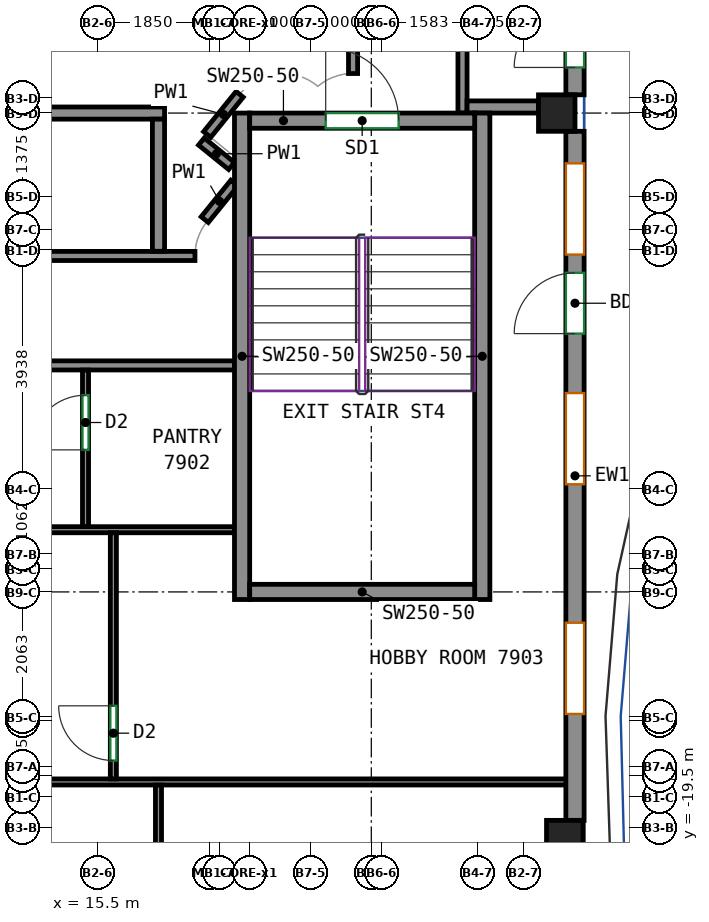
"""IFC4 building model, lengths in metres.
Left out: names, types, materials, properties, quantities, classifications, styles, units other than length and angle.
Written with IfcOpenShell. Run it as: python <this file> out.ifc"""

import sys

from ifc_helpers import new_model, si_unit, direction, frame, frame_2d, origin, origin_2d, place, context, subcontext, project, spatial, rectangle, extrude, source, transform, mapped, element, fill, save


model = new_model("IFC4")
c1 = context("Model", 3, precision=1e-05, world=origin(), true_north=direction((0.0, 1.0)))
c2 = subcontext(c1, "Body", "Model", "MODEL_VIEW")
j1 = project(units=[si_unit("LENGTHUNIT", "METRE"), si_unit("PLANEANGLEUNIT", "RADIAN")], contexts=[c1])
p1 = place(None, origin())
s1 = spatial("IfcSite", under=j1, at=p1, CompositionType="ELEMENT")
p2 = place(p1, origin())
s2 = spatial("IfcBuilding", under=s1, at=p2, CompositionType="ELEMENT")
p3 = place(p2, frame((0.0, 0.0, 315.4)))
s3 = spatial("IfcBuildingStorey", under=s2, at=p3, CompositionType="ELEMENT", Elevation=315.4)
m1 = source(origin(), c2, "Body", "SweptSolid", [
    extrude(rectangle(XDim=0.6, YDim=0.6, at=origin_2d()), origin(), (0.0, 0.0, 1.0), 3.0),
])
for number, where, z_axis, x_axis in (
    (1, (23.05, -7.75, 0.0), (0.0, 0.0, 1.0), (1.0, 0.0, 0.0)),
    (2, (23.182, -19.682, 0.0), (0.0, 0.0, 1.0), (1.0, 0.0, 0.0)),
):
    element("IfcColumn", number, at=place(p3, frame(where, z_axis=z_axis, x_axis=x_axis)), inside=s3, PredefinedType="COLUMN", context=c2, shape_type="MappedRepresentation", body=[
        mapped(m1, transform((0.0, 0.0, 0.0))),
    ])
m2 = source(origin(), c2, "Body", "SweptSolid", [
    extrude(rectangle(XDim=8.0, YDim=0.25, at=frame_2d((4.0, 0.0))), origin(), (0.0, 0.0, 1.0), 3.0),
])
for number, where, z_axis, x_axis in (
    (3, (17.875, -15.75, 0.0), (0.0, 0.0, 1.0), (0.0, 1.0, 0.0)),
    (4, (21.825, -15.75, 0.0), (0.0, 0.0, 1.0), (0.0, 1.0, 0.0)),
):
    element("IfcWall", number, at=place(p3, frame(where, z_axis=z_axis, x_axis=x_axis)), inside=s3, PredefinedType="SHEAR", context=c2, shape_type="MappedRepresentation", body=[
        mapped(m2, transform((0.0, 0.0, 0.0))),
    ])
m3 = source(origin(), c2, "Body", "SweptSolid", [
    extrude(rectangle(XDim=3.7, YDim=0.25, at=frame_2d((1.85, 0.0))), origin(), (0.0, 0.0, 1.0), 3.0),
])
p4 = place(p3, frame((18.0, -15.625, 0.0), z_axis=(0.0, 0.0, 1.0), x_axis=(1.0, 0.0, 0.0)))
e5 = element("IfcWall", 5, at=p4, inside=s3, PredefinedType="SHEAR", context=c2, shape_type="MappedRepresentation", body=[
    mapped(m3, transform((0.0, 0.0, 0.0))),
])
p5 = place(p3, frame((18.0, -7.875, 0.0), z_axis=(0.0, 0.0, 1.0), x_axis=(1.0, 0.0, 0.0)))
e6 = element("IfcWall", 6, at=p5, inside=s3, PredefinedType="SHEAR", context=c2, shape_type="MappedRepresentation", body=[
    mapped(m3, transform((0.0, 0.0, 0.0))),
])
p6 = place(p5, frame((1.25, 0.0, 0.0)))
e7 = element("IfcOpeningElement", 7, at=p6, cuts=e6, PredefinedType="OPENING", context=c2, shape_type="SweptSolid", body=[
    extrude(rectangle(XDim=1.2, YDim=2.1, at=frame_2d((0.6, 1.05))), frame((0.0, 0.135, 0.0), z_axis=(0.0, -1.0, 0.0), x_axis=(1.0, 0.0, 0.0)), (0.0, 0.0, 1.0), 0.27),
])
m4 = source(origin(), c2, "Body", "SweptSolid", [
    extrude(rectangle(XDim=11.332, YDim=0.3, at=frame_2d((5.666, 0.0))), origin(), (0.0, 0.0, 1.0), 3.0),
])
p7 = place(p3, frame((23.35, -19.382, 0.0), z_axis=(0.0, 0.0, 1.0), x_axis=(0.0, 1.0, 0.0)))
e8 = element("IfcWall", 8, at=p7, inside=s3, PredefinedType="SOLIDWALL", context=c2, shape_type="MappedRepresentation", body=[
    mapped(m4, transform((0.0, 0.0, 0.0))),
])
p8 = place(p7, frame((1.75, 0.0, 0.8)))
e9 = element("IfcOpeningElement", 9, at=p8, cuts=e8, PredefinedType="OPENING", context=c2, shape_type="SweptSolid", body=[
    extrude(rectangle(XDim=1.5, YDim=2.05, at=frame_2d((0.75, 1.025))), frame((0.0, 0.16, 0.0), z_axis=(0.0, -1.0, 0.0), x_axis=(1.0, 0.0, 0.0)), (0.0, 0.0, 1.0), 0.32),
])
p9 = place(p7, frame((5.527, 0.0, 0.8)))
e10 = element("IfcOpeningElement", 10, at=p9, cuts=e8, PredefinedType="OPENING", context=c2, shape_type="SweptSolid", body=[
    extrude(rectangle(XDim=1.5, YDim=2.05, at=frame_2d((0.75, 1.025))), frame((0.0, 0.16, 0.0), z_axis=(0.0, -1.0, 0.0), x_axis=(1.0, 0.0, 0.0)), (0.0, 0.0, 1.0), 0.32),
])
p10 = place(p7, frame((9.304, 0.0, 0.8)))
e11 = element("IfcOpeningElement", 11, at=p10, cuts=e8, PredefinedType="OPENING", context=c2, shape_type="SweptSolid", body=[
    extrude(rectangle(XDim=1.5, YDim=2.05, at=frame_2d((0.75, 1.025))), frame((0.0, 0.16, 0.0), z_axis=(0.0, -1.0, 0.0), x_axis=(1.0, 0.0, 0.0)), (0.0, 0.0, 1.0), 0.32),
])
p11 = place(p7, frame((8.004, 0.0, 0.0)))
e12 = element("IfcOpeningElement", 12, at=p11, cuts=e8, PredefinedType="OPENING", context=c2, shape_type="SweptSolid", body=[
    extrude(rectangle(XDim=1.0, YDim=2.1, at=frame_2d((0.5, 1.05))), frame((0.0, 0.16, 0.0), z_axis=(0.0, -1.0, 0.0), x_axis=(1.0, 0.0, 0.0)), (0.0, 0.0, 1.0), 0.32),
])
m5 = source(origin(), c2, "Body", "SweptSolid", [
    extrude(rectangle(XDim=7.275, YDim=0.3, at=frame_2d((3.637, 0.0))), origin(), (0.0, 0.0, 1.0), 3.0),
])
p12 = place(p3, frame((23.35, -7.45, 0.0), z_axis=(0.0, 0.0, 1.0), x_axis=(0.0, 1.0, 0.0)))
e13 = element("IfcWall", 13, at=p12, inside=s3, PredefinedType="SOLIDWALL", context=c2, shape_type="MappedRepresentation", body=[
    mapped(m5, transform((0.0, 0.0, 0.0))),
])
p13 = place(p12, frame((1.75, 0.0, 0.8)))
e14 = element("IfcOpeningElement", 14, at=p13, cuts=e13, PredefinedType="OPENING", context=c2, shape_type="SweptSolid", body=[
    extrude(rectangle(XDim=1.5, YDim=2.05, at=frame_2d((0.75, 1.025))), frame((0.0, 0.16, 0.0), z_axis=(0.0, -1.0, 0.0), x_axis=(1.0, 0.0, 0.0)), (0.0, 0.0, 1.0), 0.32),
])
p14 = place(p12, frame((0.45, 0.0, 0.0)))
e15 = element("IfcOpeningElement", 15, at=p14, cuts=e13, PredefinedType="OPENING", context=c2, shape_type="SweptSolid", body=[
    extrude(rectangle(XDim=1.0, YDim=2.1, at=frame_2d((0.5, 1.05))), frame((0.0, 0.16, 0.0), z_axis=(0.0, -1.0, 0.0), x_axis=(1.0, 0.0, 0.0)), (0.0, 0.0, 1.0), 0.32),
])
p15 = place(p12, frame((5.387, 0.0, 0.8)))
e16 = element("IfcOpeningElement", 16, at=p15, cuts=e13, PredefinedType="OPENING", context=c2, shape_type="SweptSolid", body=[
    extrude(rectangle(XDim=1.5, YDim=2.05, at=frame_2d((0.75, 1.025))), frame((0.0, 0.16, 0.0), z_axis=(0.0, -1.0, 0.0), x_axis=(1.0, 0.0, 0.0)), (0.0, 0.0, 1.0), 0.32),
])
p16 = place(p12, frame((4.087, 0.0, 0.0)))
e17 = element("IfcOpeningElement", 17, at=p16, cuts=e13, PredefinedType="OPENING", context=c2, shape_type="SweptSolid", body=[
    extrude(rectangle(XDim=1.0, YDim=2.1, at=frame_2d((0.5, 1.05))), frame((0.0, 0.16, 0.0), z_axis=(0.0, -1.0, 0.0), x_axis=(1.0, 0.0, 0.0)), (0.0, 0.0, 1.0), 0.32),
])
p17 = place(p3, frame((-4.51, -11.9, 0.0), z_axis=(0.0, 0.0, 1.0), x_axis=(1.0, 0.0, 0.0)))
e18 = element("IfcWall", 18, at=p17, inside=s3, PredefinedType="PARTITIONING", context=c2, shape_type="SweptSolid", body=[
    extrude(rectangle(XDim=22.26, YDim=0.15, at=frame_2d((11.13, 0.0))), origin(), (0.0, 0.0, 1.0), 3.0),
])
p18 = place(p17, frame((9.866, 0.0, 0.0)))
e19 = element("IfcOpeningElement", 19, at=p18, cuts=e18, PredefinedType="OPENING", context=c2, shape_type="SweptSolid", body=[
    extrude(rectangle(XDim=1.0, YDim=2.1, at=frame_2d((0.5, 1.05))), frame((0.0, 0.085, 0.0), z_axis=(0.0, -1.0, 0.0), x_axis=(1.0, 0.0, 0.0)), (0.0, 0.0, 1.0), 0.17),
])
p19 = place(p3, frame((21.5, -7.75, 0.0), z_axis=(0.0, 0.0, 1.0), x_axis=(0.0, 1.0, 0.0)))
e20 = element("IfcWall", 20, at=p19, inside=s3, PredefinedType="PARTITIONING", context=c2, shape_type="SweptSolid", body=[
    extrude(rectangle(XDim=4.999, YDim=0.15, at=frame_2d((2.5, 0.0))), origin(), (0.0, 0.0, 1.0), 3.0),
])
p20 = place(p19, frame((2.565, 0.0, 0.0)))
e21 = element("IfcOpeningElement", 21, at=p20, cuts=e20, PredefinedType="OPENING", context=c2, shape_type="SweptSolid", body=[
    extrude(rectangle(XDim=1.0, YDim=2.1, at=frame_2d((0.5, 1.05))), frame((0.0, 0.085, 0.0), z_axis=(0.0, -1.0, 0.0), x_axis=(1.0, 0.0, 0.0)), (0.0, 0.0, 1.0), 0.17),
])
p21 = place(p3, frame((-13.55, -10.1, 0.0), z_axis=(0.0, 0.0, 1.0), x_axis=(1.0, 0.0, 0.0)))
e22 = element("IfcWall", 22, at=p21, inside=s3, PredefinedType="PARTITIONING", context=c2, shape_type="SweptSolid", body=[
    extrude(rectangle(XDim=30.65, YDim=0.15, at=frame_2d((15.325, 0.0))), origin(), (0.0, 0.0, 1.0), 3.0),
])
p22 = place(p21, frame((13.442, 0.0, 0.0)))
e23 = element("IfcOpeningElement", 23, at=p22, cuts=e22, PredefinedType="OPENING", context=c2, shape_type="SweptSolid", body=[
    extrude(rectangle(XDim=0.9, YDim=2.1, at=frame_2d((0.45, 1.05))), frame((0.0, 0.085, 0.0), z_axis=(0.0, -1.0, 0.0), x_axis=(1.0, 0.0, 0.0)), (0.0, 0.0, 1.0), 0.17),
])
p23 = place(p21, frame((25.452, 0.0, 0.0)))
e24 = element("IfcOpeningElement", 24, at=p23, cuts=e22, PredefinedType="OPENING", context=c2, shape_type="SweptSolid", body=[
    extrude(rectangle(XDim=0.9, YDim=2.1, at=frame_2d((0.45, 1.05))), frame((0.0, 0.085, 0.0), z_axis=(0.0, -1.0, 0.0), x_axis=(1.0, 0.0, 0.0)), (0.0, 0.0, 1.0), 0.17),
])
p24 = place(p3, frame((17.748, -8.902, 0.0), z_axis=(0.0, 0.0, 1.0), x_axis=(-0.630342797145, -0.776316918589, 0.0)))
e25 = element("IfcWall", 25, at=p24, inside=s3, PredefinedType="PARTITIONING", context=c2, shape_type="SweptSolid", body=[
    extrude(rectangle(XDim=0.773, YDim=0.15, at=frame_2d((0.386, 0.0))), origin(), (0.0, 0.0, 1.0), 3.0),
])
p25 = place(p3, frame((17.206, -8.218, 0.0), z_axis=(0.0, 0.0, 1.0), x_axis=(0.776102288291, -0.630607039376, 0.0)))
e26 = element("IfcWall", 26, at=p25, inside=s3, PredefinedType="PARTITIONING", context=c2, shape_type="SweptSolid", body=[
    extrude(rectangle(XDim=0.638, YDim=0.15, at=frame_2d((0.319, 0.0))), origin(), (0.0, 0.0, 1.0), 3.0),
])
p26 = place(p3, frame((17.835, -7.442, 0.0), z_axis=(0.0, 0.0, 1.0), x_axis=(-0.628859024249, -0.777519342281, 0.0)))
e27 = element("IfcWall", 27, at=p26, inside=s3, PredefinedType="PARTITIONING", context=c2, shape_type="SweptSolid", body=[
    extrude(rectangle(XDim=0.849, YDim=0.15, at=frame_2d((0.425, 0.0))), origin(), (0.0, 0.0, 1.0), 3.0),
])
p27 = place(p3, frame((19.7, -7.1, 0.0), z_axis=(0.0, 0.0, 1.0), x_axis=(0.0, 1.0, 0.0)))
e28 = element("IfcWall", 28, at=p27, inside=s3, PredefinedType="PARTITIONING", context=c2, shape_type="SweptSolid", body=[
    extrude(rectangle(XDim=6.901, YDim=0.15, at=frame_2d((3.451, 0.0))), origin(), (0.0, 0.0, 1.0), 3.0),
])
p28 = place(p27, frame((5.601, 0.0, 0.0)))
e29 = element("IfcOpeningElement", 29, at=p28, cuts=e28, PredefinedType="OPENING", context=c2, shape_type="SweptSolid", body=[
    extrude(rectangle(XDim=0.9, YDim=2.1, at=frame_2d((0.45, 1.05))), frame((0.0, 0.085, 0.0), z_axis=(0.0, -1.0, 0.0), x_axis=(1.0, 0.0, 0.0)), (0.0, 0.0, 1.0), 0.17),
])
p29 = place(p3, frame((-1.41, -14.602, 0.0), z_axis=(0.0, 0.0, 1.0), x_axis=(1.0, 0.0, 0.0)))
e30 = element("IfcWall", 30, at=p29, inside=s3, PredefinedType="PARTITIONING", context=c2, shape_type="SweptSolid", body=[
    extrude(rectangle(XDim=19.16, YDim=0.1, at=frame_2d((9.58, 0.0))), origin(), (0.0, 0.0, 1.0), 3.0),
])
p30 = place(p29, frame((4.357, 0.0, 0.0)))
e31 = element("IfcOpeningElement", 31, at=p30, cuts=e30, PredefinedType="OPENING", context=c2, shape_type="SweptSolid", body=[
    extrude(rectangle(XDim=1.0, YDim=2.1, at=frame_2d((0.5, 1.05))), frame((0.0, 0.06, 0.0), z_axis=(0.0, -1.0, 0.0), x_axis=(1.0, 0.0, 0.0)), (0.0, 0.0, 1.0), 0.12),
])
p31 = place(p29, frame((11.804, 0.0, 0.0)))
e32 = element("IfcOpeningElement", 32, at=p31, cuts=e30, PredefinedType="OPENING", context=c2, shape_type="SweptSolid", body=[
    extrude(rectangle(XDim=0.9, YDim=2.1, at=frame_2d((0.45, 1.05))), frame((0.0, 0.06, 0.0), z_axis=(0.0, -1.0, 0.0), x_axis=(1.0, 0.0, 0.0)), (0.0, 0.0, 1.0), 0.12),
])
p32 = place(p29, frame((14.91, 0.0, 0.0)))
e33 = element("IfcOpeningElement", 33, at=p32, cuts=e30, PredefinedType="OPENING", context=c2, shape_type="SweptSolid", body=[
    extrude(rectangle(XDim=0.9, YDim=2.1, at=frame_2d((0.45, 1.05))), frame((0.0, 0.06, 0.0), z_axis=(0.0, -1.0, 0.0), x_axis=(1.0, 0.0, 0.0)), (0.0, 0.0, 1.0), 0.12),
])
p33 = place(p3, frame((-4.6, -18.75, 0.0), z_axis=(0.0, 0.0, 1.0), x_axis=(1.0, 0.0, 0.0)))
e34 = element("IfcWall", 34, at=p33, inside=s3, PredefinedType="PARTITIONING", context=c2, shape_type="SweptSolid", body=[
    extrude(rectangle(XDim=27.85, YDim=0.1, at=frame_2d((13.925, 0.0))), origin(), (0.0, 0.0, 1.0), 3.0),
])
p34 = place(p33, frame((3.741, 0.0, 0.0)))
e35 = element("IfcOpeningElement", 35, at=p34, cuts=e34, PredefinedType="OPENING", context=c2, shape_type="SweptSolid", body=[
    extrude(rectangle(XDim=0.9, YDim=2.1, at=frame_2d((0.45, 1.05))), frame((0.0, 0.06, 0.0), z_axis=(0.0, -1.0, 0.0), x_axis=(1.0, 0.0, 0.0)), (0.0, 0.0, 1.0), 0.12),
])
p35 = place(p33, frame((5.91, 0.0, 0.0)))
e36 = element("IfcOpeningElement", 36, at=p35, cuts=e34, PredefinedType="OPENING", context=c2, shape_type="SweptSolid", body=[
    extrude(rectangle(XDim=1.0, YDim=2.1, at=frame_2d((0.5, 1.05))), frame((0.0, 0.06, 0.0), z_axis=(0.0, -1.0, 0.0), x_axis=(1.0, 0.0, 0.0)), (0.0, 0.0, 1.0), 0.12),
])
p36 = place(p3, frame((15.758, -18.7, 0.0), z_axis=(0.0, 0.0, 1.0), x_axis=(0.0, 1.0, 0.0)))
e37 = element("IfcWall", 37, at=p36, inside=s3, PredefinedType="PARTITIONING", context=c2, shape_type="SweptSolid", body=[
    extrude(rectangle(XDim=4.048, YDim=0.1, at=frame_2d((2.024, 0.0))), origin(), (0.0, 0.0, 1.0), 3.0),
])
p37 = place(p36, frame((0.302, 0.0, 0.0)))
e38 = element("IfcOpeningElement", 38, at=p37, cuts=e37, PredefinedType="OPENING", context=c2, shape_type="SweptSolid", body=[
    extrude(rectangle(XDim=0.9, YDim=2.1, at=frame_2d((0.45, 1.05))), frame((0.0, 0.06, 0.0), z_axis=(0.0, -1.0, 0.0), x_axis=(1.0, 0.0, 0.0)), (0.0, 0.0, 1.0), 0.12),
])
p38 = place(p3, frame((22.75, -7.65, 0.0), z_axis=(0.0, 0.0, 1.0), x_axis=(-1.0, 0.0, 0.0)))
e39 = element("IfcWall", 39, at=p38, inside=s3, PredefinedType="PARTITIONING", context=c2, shape_type="SweptSolid", body=[
    extrude(rectangle(XDim=1.175, YDim=0.2, at=frame_2d((0.587, 0.0))), origin(), (0.0, 0.0, 1.0), 3.0),
])
p39 = place(p3, frame((15.3, -14.55, 0.0), z_axis=(0.0, 0.0, 1.0), x_axis=(0.0, 1.0, 0.0)))
e40 = element("IfcWall", 40, at=p39, inside=s3, PredefinedType="PARTITIONING", context=c2, shape_type="SweptSolid", body=[
    extrude(rectangle(XDim=2.573, YDim=0.1, at=frame_2d((1.287, 0.0))), origin(), (0.0, 0.0, 1.0), 3.0),
])
p40 = place(p39, frame((1.261, 0.0, 0.0)))
e41 = element("IfcOpeningElement", 41, at=p40, cuts=e40, PredefinedType="OPENING", context=c2, shape_type="SweptSolid", body=[
    extrude(rectangle(XDim=0.9, YDim=2.1, at=frame_2d((0.45, 1.05))), frame((0.0, 0.06, 0.0), z_axis=(0.0, -1.0, 0.0), x_axis=(1.0, 0.0, 0.0)), (0.0, 0.0, 1.0), 0.12),
])
p41 = place(p3, frame((16.5, -23.25, 0.0), z_axis=(0.0, 0.0, 1.0), x_axis=(0.0, 1.0, 0.0)))
e42 = element("IfcWall", 42, at=p41, inside=s3, PredefinedType="PARTITIONING", context=c2, shape_type="SweptSolid", body=[
    extrude(rectangle(XDim=4.448, YDim=0.1, at=frame_2d((2.224, 0.0))), origin(), (0.0, 0.0, 1.0), 3.0),
])
p42 = place(p41, frame((1.419, 0.0, 0.0)))
e43 = element("IfcOpeningElement", 43, at=p42, cuts=e42, PredefinedType="OPENING", context=c2, shape_type="SweptSolid", body=[
    extrude(rectangle(XDim=0.9, YDim=2.1, at=frame_2d((0.45, 1.05))), frame((0.0, 0.06, 0.0), z_axis=(0.0, -1.0, 0.0), x_axis=(1.0, 0.0, 0.0)), (0.0, 0.0, 1.0), 0.12),
])
p43 = place(p3, frame((16.6, -7.75, 0.0), z_axis=(0.0, 0.0, 1.0), x_axis=(-1.0, 0.0, 0.0)))
e44 = element("IfcWall", 44, at=p43, inside=s3, PredefinedType="PARTITIONING", context=c2, shape_type="SweptSolid", body=[
    extrude(rectangle(XDim=3.175, YDim=0.2, at=frame_2d((1.587, 0.0))), origin(), (0.0, 0.0, 1.0), 3.0),
])
p44 = place(p3, frame((16.5, -10.023, 0.0), z_axis=(0.0, 0.0, 1.0), x_axis=(0.0, 1.0, 0.0)))
e45 = element("IfcWall", 45, at=p44, inside=s3, PredefinedType="PARTITIONING", context=c2, shape_type="SweptSolid", body=[
    extrude(rectangle(XDim=2.173, YDim=0.2, at=frame_2d((1.086, 0.0))), origin(), (0.0, 0.0, 1.0), 3.0),
])
p45 = place(p8, origin())
e46 = element("IfcWindow", 46, at=p45, inside=s3, PartitioningType="SINGLE_PANEL", PredefinedType="WINDOW", context=c2, shape_type="SweptSolid", body=[
    extrude(rectangle(XDim=1.5, YDim=2.05, at=frame_2d((0.75, 1.025))), frame((0.0, 0.03, 0.0), z_axis=(0.0, -1.0, 0.0), x_axis=(1.0, 0.0, 0.0)), (0.0, 0.0, 1.0), 0.06),
])
fill(e9, e46)
p46 = place(p9, origin())
e47 = element("IfcWindow", 47, at=p46, inside=s3, PartitioningType="SINGLE_PANEL", PredefinedType="WINDOW", context=c2, shape_type="SweptSolid", body=[
    extrude(rectangle(XDim=1.5, YDim=2.05, at=frame_2d((0.75, 1.025))), frame((0.0, 0.03, 0.0), z_axis=(0.0, -1.0, 0.0), x_axis=(1.0, 0.0, 0.0)), (0.0, 0.0, 1.0), 0.06),
])
fill(e10, e47)
p47 = place(p10, origin())
e48 = element("IfcWindow", 48, at=p47, inside=s3, PartitioningType="SINGLE_PANEL", PredefinedType="WINDOW", context=c2, shape_type="SweptSolid", body=[
    extrude(rectangle(XDim=1.5, YDim=2.05, at=frame_2d((0.75, 1.025))), frame((0.0, 0.03, 0.0), z_axis=(0.0, -1.0, 0.0), x_axis=(1.0, 0.0, 0.0)), (0.0, 0.0, 1.0), 0.06),
])
fill(e11, e48)
p48 = place(p11, origin())
e49 = element("IfcDoor", 49, at=p48, inside=s3, OperationType="SINGLE_SWING_LEFT", PredefinedType="DOOR", context=c2, shape_type="SweptSolid", body=[
    extrude(rectangle(XDim=1.0, YDim=2.1, at=frame_2d((0.5, 1.05))), frame((0.0, 0.025, 0.0), z_axis=(0.0, -1.0, 0.0), x_axis=(1.0, 0.0, 0.0)), (0.0, 0.0, 1.0), 0.05),
])
fill(e12, e49)
p49 = place(p14, origin())
e50 = element("IfcDoor", 50, at=p49, inside=s3, OperationType="SINGLE_SWING_LEFT", PredefinedType="DOOR", context=c2, shape_type="SweptSolid", body=[
    extrude(rectangle(XDim=1.0, YDim=2.1, at=frame_2d((0.5, 1.05))), frame((0.0, 0.025, 0.0), z_axis=(0.0, -1.0, 0.0), x_axis=(1.0, 0.0, 0.0)), (0.0, 0.0, 1.0), 0.05),
])
fill(e15, e50)
p50 = place(p6, origin())
e51 = element("IfcDoor", 51, at=p50, inside=s3, OperationType="DOUBLE_DOOR_SINGLE_SWING", PredefinedType="DOOR", context=c2, shape_type="SweptSolid", body=[
    extrude(rectangle(XDim=1.2, YDim=2.1, at=frame_2d((0.6, 1.05))), frame((0.0, 0.025, 0.0), z_axis=(0.0, -1.0, 0.0), x_axis=(1.0, 0.0, 0.0)), (0.0, 0.0, 1.0), 0.05),
])
fill(e7, e51)
p51 = place(p37, origin())
e52 = element("IfcDoor", 52, at=p51, inside=s3, OperationType="SINGLE_SWING_RIGHT", PredefinedType="DOOR", context=c2, shape_type="SweptSolid", body=[
    extrude(rectangle(XDim=0.9, YDim=2.1, at=frame_2d((0.45, 1.05))), frame((0.0, 0.025, 0.0), z_axis=(0.0, -1.0, 0.0), x_axis=(1.0, 0.0, 0.0)), (0.0, 0.0, 1.0), 0.05),
])
fill(e38, e52)
p52 = place(p40, origin())
e53 = element("IfcDoor", 53, at=p52, inside=s3, OperationType="SINGLE_SWING_LEFT", PredefinedType="DOOR", context=c2, shape_type="SweptSolid", body=[
    extrude(rectangle(XDim=0.9, YDim=2.1, at=frame_2d((0.45, 1.05))), frame((0.0, 0.025, 0.0), z_axis=(0.0, -1.0, 0.0), x_axis=(1.0, 0.0, 0.0)), (0.0, 0.0, 1.0), 0.05),
])
fill(e41, e53)
save(model, sys.argv[1])
